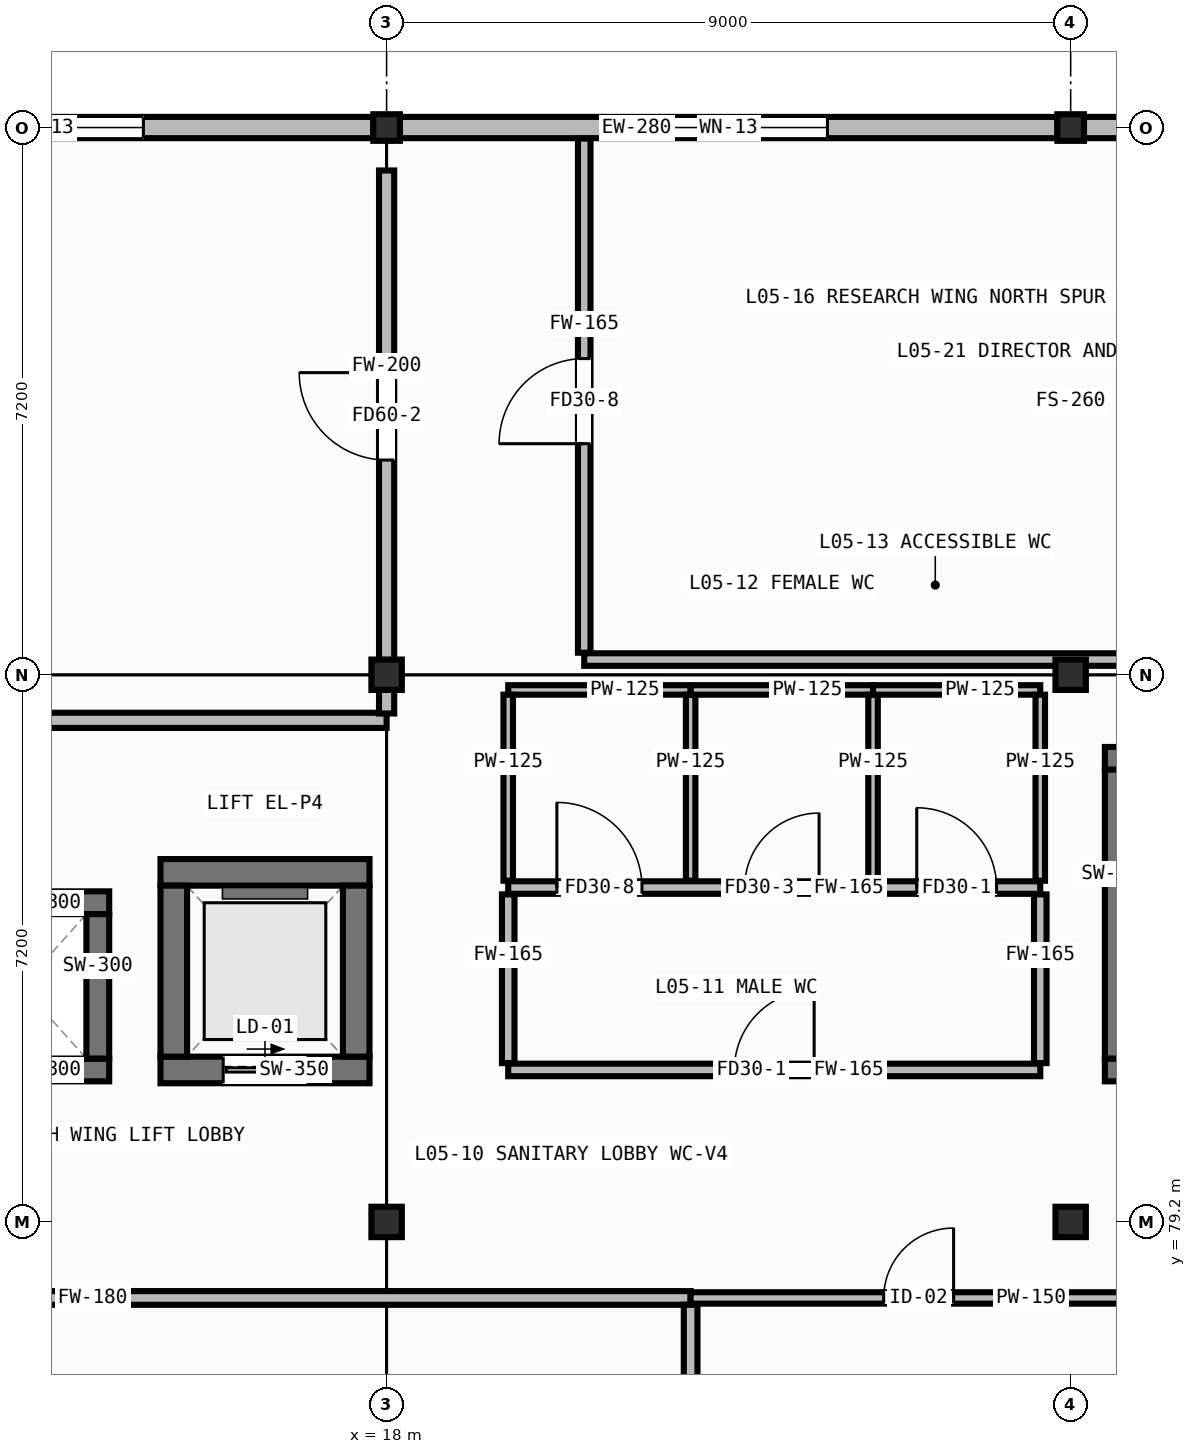
"""IFC4 building model, lengths in metres.
Left out: names, types, materials, properties, quantities, classifications, styles, units other than length and angle.
Written with IfcOpenShell. Run it as: python <this file> out.ifc"""

import sys

from ifc_helpers import new_model, si_unit, direction, frame, frame_2d, origin, origin_2d, place, context, subcontext, project, spatial, rectangle, hollow_rectangle, extrude, element, fill, save


model = new_model("IFC4")
c1 = context("Model", 3, precision=1e-05, world=origin(), true_north=direction((0.0, 1.0)))
c2 = subcontext(c1, "Body", "Model", "MODEL_VIEW")
j1 = project(units=[si_unit("LENGTHUNIT", "METRE"), si_unit("PLANEANGLEUNIT", "RADIAN")], contexts=[c1])
p1 = place(None, origin())
s1 = spatial("IfcSite", under=j1, at=p1, CompositionType="ELEMENT")
p2 = place(p1, origin())
s2 = spatial("IfcBuilding", under=s1, at=p2, CompositionType="ELEMENT")
p3 = place(p2, frame((0.0, 0.0, 17.0)))
s3 = spatial("IfcBuildingStorey", under=s2, at=p3, CompositionType="ELEMENT", Elevation=17.0)
for number, where, z_axis, x_axis in (
    (1, (18.0, 79.2, 0.0), (0.0, 0.0, 1.0), (1.0, 0.0, 0.0)),
    (2, (18.0, 86.4, 0.0), (0.0, 0.0, 1.0), (1.0, 0.0, 0.0)),
):
    element("IfcColumn", number, at=place(p3, frame(where, z_axis=z_axis, x_axis=x_axis)), inside=s3, PredefinedType="COLUMN", context=c2, shape_type="SweptSolid", body=[
        extrude(hollow_rectangle(XDim=0.4, YDim=0.4, WallThickness=0.016, at=origin_2d()), origin(), (0.0, 0.0, 1.0), 3.6),
    ])
p4 = place(p3, frame((18.0, 93.6, 0.0), z_axis=(0.0, 0.0, 1.0), x_axis=(1.0, 0.0, 0.0)))
e3 = element("IfcColumn", 3, at=p4, inside=s3, PredefinedType="COLUMN", context=c2, shape_type="SweptSolid", body=[
    extrude(hollow_rectangle(XDim=0.35, YDim=0.35, WallThickness=0.012, at=origin_2d()), origin(), (0.0, 0.0, 1.0), 3.6),
])
for number, where, z_axis, x_axis in (
    (4, (27.0, 79.2, 0.0), (0.0, 0.0, 1.0), (1.0, 0.0, 0.0)),
    (5, (27.0, 86.4, 0.0), (0.0, 0.0, 1.0), (1.0, 0.0, 0.0)),
):
    element("IfcColumn", number, at=place(p3, frame(where, z_axis=z_axis, x_axis=x_axis)), inside=s3, PredefinedType="COLUMN", context=c2, shape_type="SweptSolid", body=[
        extrude(hollow_rectangle(XDim=0.4, YDim=0.4, WallThickness=0.016, at=origin_2d()), origin(), (0.0, 0.0, 1.0), 3.6),
    ])
p5 = place(p3, frame((27.0, 93.6, 0.0), z_axis=(0.0, 0.0, 1.0), x_axis=(1.0, 0.0, 0.0)))
e6 = element("IfcColumn", 6, at=p5, inside=s3, PredefinedType="COLUMN", context=c2, shape_type="SweptSolid", body=[
    extrude(hollow_rectangle(XDim=0.35, YDim=0.35, WallThickness=0.012, at=origin_2d()), origin(), (0.0, 0.0, 1.0), 3.6),
])
p6 = place(p3, frame((17.825, 93.6, 0.0), z_axis=(0.0, 0.0, 1.0), x_axis=(-1.0, 0.0, 0.0)))
e7 = element("IfcWall", 7, at=p6, inside=s3, PredefinedType="STANDARD", context=c2, shape_type="SweptSolid", body=[
    extrude(rectangle(XDim=8.65, YDim=0.28, at=frame_2d((4.325, 0.0))), origin(), (0.0, 0.0, 1.0), 2.95),
])
p7 = place(p6, frame((3.025, 0.0, 0.85)))
e8 = element("IfcOpeningElement", 8, at=p7, cuts=e7, PredefinedType="OPENING", context=c2, shape_type="SweptSolid", body=[
    extrude(rectangle(XDim=2.6, YDim=1.6, at=frame_2d((1.3, 0.8))), frame((0.0, 0.152, 0.0), z_axis=(0.0, -1.0, 0.0), x_axis=(1.0, 0.0, 0.0)), (0.0, 0.0, 1.0), 0.304),
])
p8 = place(p3, frame((26.825, 93.6, 0.0), z_axis=(0.0, 0.0, 1.0), x_axis=(-1.0, 0.0, 0.0)))
e9 = element("IfcWall", 9, at=p8, inside=s3, PredefinedType="STANDARD", context=c2, shape_type="SweptSolid", body=[
    extrude(rectangle(XDim=8.65, YDim=0.28, at=frame_2d((4.325, 0.0))), origin(), (0.0, 0.0, 1.0), 2.95),
])
p9 = place(p8, frame((3.025, 0.0, 0.85)))
e10 = element("IfcOpeningElement", 10, at=p9, cuts=e9, PredefinedType="OPENING", context=c2, shape_type="SweptSolid", body=[
    extrude(rectangle(XDim=2.6, YDim=1.6, at=frame_2d((1.3, 0.8))), frame((0.0, 0.152, 0.0), z_axis=(0.0, -1.0, 0.0), x_axis=(1.0, 0.0, 0.0)), (0.0, 0.0, 1.0), 0.304),
])
p10 = place(p3, frame((35.825, 93.6, 0.0), z_axis=(0.0, 0.0, 1.0), x_axis=(-1.0, 0.0, 0.0)))
e11 = element("IfcWall", 11, at=p10, inside=s3, PredefinedType="STANDARD", context=c2, shape_type="SweptSolid", body=[
    extrude(rectangle(XDim=8.65, YDim=0.28, at=frame_2d((4.325, 0.0))), origin(), (0.0, 0.0, 1.0), 2.95),
])
p11 = place(p10, frame((3.025, 0.0, 0.85)))
e12 = element("IfcOpeningElement", 12, at=p11, cuts=e11, PredefinedType="OPENING", context=c2, shape_type="SweptSolid", body=[
    extrude(rectangle(XDim=2.6, YDim=1.6, at=frame_2d((1.3, 0.8))), frame((0.0, 0.152, 0.0), z_axis=(0.0, -1.0, 0.0), x_axis=(1.0, 0.0, 0.0)), (0.0, 0.0, 1.0), 0.304),
])
p12 = place(p3, frame((27.45, 81.2, 0.0), z_axis=(0.0, 0.0, 1.0), x_axis=(1.0, 0.0, 0.0)))
e13 = element("IfcWall", 13, at=p12, inside=s3, PredefinedType="SHEAR", context=c2, shape_type="SweptSolid", body=[
    extrude(rectangle(XDim=8.1, YDim=0.3, at=frame_2d((4.05, 0.0))), origin(), (0.0, 0.0, 1.0), 3.34),
])
p13 = place(p12, frame((0.5, 0.0, 0.0)))
e14 = element("IfcOpeningElement", 14, at=p13, cuts=e13, PredefinedType="OPENING", context=c2, shape_type="SweptSolid", body=[
    extrude(rectangle(XDim=1.2, YDim=2.1, at=frame_2d((0.6, 1.05))), frame((0.0, 0.162, 0.0), z_axis=(0.0, -1.0, 0.0), x_axis=(1.0, 0.0, 0.0)), (0.0, 0.0, 1.0), 0.324),
])
p14 = place(p3, frame((27.45, 85.3, 0.0), z_axis=(0.0, 0.0, 1.0), x_axis=(1.0, 0.0, 0.0)))
e15 = element("IfcWall", 15, at=p14, inside=s3, PredefinedType="SHEAR", context=c2, shape_type="SweptSolid", body=[
    extrude(rectangle(XDim=8.1, YDim=0.3, at=frame_2d((4.05, 0.0))), origin(), (0.0, 0.0, 1.0), 3.34),
])
p15 = place(p3, frame((27.6, 81.35, 0.0), z_axis=(0.0, 0.0, 1.0), x_axis=(0.0, 1.0, 0.0)))
e16 = element("IfcWall", 16, at=p15, inside=s3, PredefinedType="SHEAR", context=c2, shape_type="SweptSolid", body=[
    extrude(rectangle(XDim=3.8, YDim=0.3, at=frame_2d((1.9, 0.0))), origin(), (0.0, 0.0, 1.0), 3.34),
])
p16 = place(p3, frame((15.025, 81.2, 0.0), z_axis=(0.0, 0.0, 1.0), x_axis=(1.0, 0.0, 0.0)))
e17 = element("IfcWall", 17, at=p16, inside=s3, PredefinedType="SHEAR", context=c2, shape_type="SweptSolid", body=[
    extrude(rectangle(XDim=2.75, YDim=0.35, at=frame_2d((1.375, 0.0))), origin(), (0.0, 0.0, 1.0), 3.34),
])
p17 = place(p16, frame((0.825, 0.0, 0.0)))
e18 = element("IfcOpeningElement", 18, at=p17, cuts=e17, PredefinedType="OPENING", context=c2, shape_type="SweptSolid", body=[
    extrude(rectangle(XDim=1.1, YDim=2.1, at=frame_2d((0.55, 1.05))), frame((0.0, 0.187, 0.0), z_axis=(0.0, -1.0, 0.0), x_axis=(1.0, 0.0, 0.0)), (0.0, 0.0, 1.0), 0.374),
])
p18 = place(p3, frame((15.025, 83.8, 0.0), z_axis=(0.0, 0.0, 1.0), x_axis=(1.0, 0.0, 0.0)))
e19 = element("IfcWall", 19, at=p18, inside=s3, PredefinedType="SHEAR", context=c2, shape_type="SweptSolid", body=[
    extrude(rectangle(XDim=2.75, YDim=0.35, at=frame_2d((1.375, 0.0))), origin(), (0.0, 0.0, 1.0), 3.34),
])
for number, where, z_axis, x_axis in (
    (20, (15.2, 81.375, 0.0), (0.0, 0.0, 1.0), (0.0, 1.0, 0.0)),
    (21, (17.6, 81.375, 0.0), (0.0, 0.0, 1.0), (0.0, 1.0, 0.0)),
):
    element("IfcWall", number, at=place(p3, frame(where, z_axis=z_axis, x_axis=x_axis)), inside=s3, PredefinedType="SHEAR", context=c2, shape_type="SweptSolid", body=[
        extrude(rectangle(XDim=2.25, YDim=0.35, at=frame_2d((1.125, 0.0))), origin(), (0.0, 0.0, 1.0), 3.34),
    ])
for number, where, z_axis, x_axis in (
    (22, (12.05, 81.2, 0.0), (0.0, 0.0, 1.0), (1.0, 0.0, 0.0)),
    (23, (12.05, 83.4, 0.0), (0.0, 0.0, 1.0), (1.0, 0.0, 0.0)),
):
    element("IfcWall", number, at=place(p3, frame(where, z_axis=z_axis, x_axis=x_axis)), inside=s3, PredefinedType="SHEAR", context=c2, shape_type="SweptSolid", body=[
        extrude(rectangle(XDim=2.3, YDim=0.3, at=frame_2d((1.15, 0.0))), origin(), (0.0, 0.0, 1.0), 3.34),
    ])
p19 = place(p3, frame((14.2, 81.35, 0.0), z_axis=(0.0, 0.0, 1.0), x_axis=(0.0, 1.0, 0.0)))
e24 = element("IfcWall", 24, at=p19, inside=s3, PredefinedType="SHEAR", context=c2, shape_type="SweptSolid", body=[
    extrude(rectangle(XDim=1.9, YDim=0.3, at=frame_2d((0.95, 0.0))), origin(), (0.0, 0.0, 1.0), 3.34),
])
p20 = place(p3, frame((19.6, 81.2, 0.0), z_axis=(0.0, 0.0, 1.0), x_axis=(1.0, 0.0, 0.0)))
e25 = element("IfcWall", 25, at=p20, inside=s3, PredefinedType="PARTITIONING", context=c2, shape_type="SweptSolid", body=[
    extrude(rectangle(XDim=7.0, YDim=0.165, at=frame_2d((3.5, 0.0))), origin(), (0.0, 0.0, 1.0), 3.34),
])
p21 = place(p20, frame((2.975, 0.0, 0.0)))
e26 = element("IfcOpeningElement", 26, at=p21, cuts=e25, PredefinedType="OPENING", context=c2, shape_type="SweptSolid", body=[
    extrude(rectangle(XDim=1.05, YDim=2.1, at=frame_2d((0.525, 1.05))), frame((0.0, 0.094, 0.0), z_axis=(0.0, -1.0, 0.0), x_axis=(1.0, 0.0, 0.0)), (0.0, 0.0, 1.0), 0.189),
])
p22 = place(p3, frame((19.6, 83.6, 0.0), z_axis=(0.0, 0.0, 1.0), x_axis=(1.0, 0.0, 0.0)))
e27 = element("IfcWall", 27, at=p22, inside=s3, PredefinedType="PARTITIONING", context=c2, shape_type="SweptSolid", body=[
    extrude(rectangle(XDim=7.0, YDim=0.165, at=frame_2d((3.5, 0.0))), origin(), (0.0, 0.0, 1.0), 3.34),
])
p23 = place(p22, frame((0.64, 0.0, 0.0)))
e28 = element("IfcOpeningElement", 28, at=p23, cuts=e27, PredefinedType="OPENING", context=c2, shape_type="SweptSolid", body=[
    extrude(rectangle(XDim=1.12, YDim=2.08, at=frame_2d((0.56, 1.04))), frame((0.0, 0.094, 0.0), z_axis=(0.0, -1.0, 0.0), x_axis=(1.0, 0.0, 0.0)), (0.0, 0.0, 1.0), 0.189),
])
p24 = place(p22, frame((3.11, 0.0, 0.0)))
e29 = element("IfcOpeningElement", 29, at=p24, cuts=e27, PredefinedType="OPENING", context=c2, shape_type="SweptSolid", body=[
    extrude(rectangle(XDim=0.98, YDim=2.02, at=frame_2d((0.49, 1.01))), frame((0.0, 0.094, 0.0), z_axis=(0.0, -1.0, 0.0), x_axis=(1.0, 0.0, 0.0)), (0.0, 0.0, 1.0), 0.189),
])
p25 = place(p22, frame((5.375, 0.0, 0.0)))
e30 = element("IfcOpeningElement", 30, at=p25, cuts=e27, PredefinedType="OPENING", context=c2, shape_type="SweptSolid", body=[
    extrude(rectangle(XDim=1.05, YDim=2.1, at=frame_2d((0.525, 1.05))), frame((0.0, 0.094, 0.0), z_axis=(0.0, -1.0, 0.0), x_axis=(1.0, 0.0, 0.0)), (0.0, 0.0, 1.0), 0.189),
])
for number, where, z_axis, x_axis in (
    (31, (19.6, 81.29, 0.0), (0.0, 0.0, 1.0), (0.0, 1.0, 0.0)),
    (32, (26.6, 81.29, 0.0), (0.0, 0.0, 1.0), (0.0, 1.0, 0.0)),
):
    element("IfcWall", number, at=place(p3, frame(where, z_axis=z_axis, x_axis=x_axis)), inside=s3, PredefinedType="PARTITIONING", context=c2, shape_type="SweptSolid", body=[
        extrude(rectangle(XDim=2.22, YDim=0.165, at=frame_2d((1.11, 0.0))), origin(), (0.0, 0.0, 1.0), 3.34),
    ])
p26 = place(p3, frame((19.6, 86.2, 0.0), z_axis=(0.0, 0.0, 1.0), x_axis=(1.0, 0.0, 0.0)))
e33 = element("IfcWall", 33, at=p26, inside=s3, PredefinedType="PARTITIONING", context=c2, shape_type="SweptSolid", body=[
    extrude(rectangle(XDim=2.4, YDim=0.125, at=frame_2d((1.2, 0.0))), origin(), (0.0, 0.0, 1.0), 2.62),
])
for number, where, z_axis, x_axis in (
    (34, (19.6, 83.69, 0.0), (0.0, 0.0, 1.0), (0.0, 1.0, 0.0)),
    (35, (22.0, 83.69, 0.0), (0.0, 0.0, 1.0), (0.0, 1.0, 0.0)),
):
    element("IfcWall", number, at=place(p3, frame(where, z_axis=z_axis, x_axis=x_axis)), inside=s3, PredefinedType="PARTITIONING", context=c2, shape_type="SweptSolid", body=[
        extrude(rectangle(XDim=2.448, YDim=0.125, at=frame_2d((1.224, 0.0))), origin(), (0.0, 0.0, 1.0), 3.34),
    ])
p27 = place(p3, frame((22.0, 86.2, 0.0), z_axis=(0.0, 0.0, 1.0), x_axis=(1.0, 0.0, 0.0)))
e36 = element("IfcWall", 36, at=p27, inside=s3, PredefinedType="PARTITIONING", context=c2, shape_type="SweptSolid", body=[
    extrude(rectangle(XDim=2.4, YDim=0.125, at=frame_2d((1.2, 0.0))), origin(), (0.0, 0.0, 1.0), 2.62),
])
p28 = place(p3, frame((24.4, 83.69, 0.0), z_axis=(0.0, 0.0, 1.0), x_axis=(0.0, 1.0, 0.0)))
e37 = element("IfcWall", 37, at=p28, inside=s3, PredefinedType="PARTITIONING", context=c2, shape_type="SweptSolid", body=[
    extrude(rectangle(XDim=2.448, YDim=0.125, at=frame_2d((1.224, 0.0))), origin(), (0.0, 0.0, 1.0), 3.34),
])
p29 = place(p3, frame((24.4, 86.2, 0.0), z_axis=(0.0, 0.0, 1.0), x_axis=(1.0, 0.0, 0.0)))
e38 = element("IfcWall", 38, at=p29, inside=s3, PredefinedType="PARTITIONING", context=c2, shape_type="SweptSolid", body=[
    extrude(rectangle(XDim=2.2, YDim=0.125, at=frame_2d((1.1, 0.0))), origin(), (0.0, 0.0, 1.0), 2.62),
])
p30 = place(p3, frame((26.6, 83.69, 0.0), z_axis=(0.0, 0.0, 1.0), x_axis=(0.0, 1.0, 0.0)))
e39 = element("IfcWall", 39, at=p30, inside=s3, PredefinedType="PARTITIONING", context=c2, shape_type="SweptSolid", body=[
    extrude(rectangle(XDim=2.448, YDim=0.125, at=frame_2d((1.224, 0.0))), origin(), (0.0, 0.0, 1.0), 3.34),
])
p31 = place(p3, frame((0.145, 78.2, 0.0), z_axis=(0.0, 0.0, 1.0), x_axis=(1.0, 0.0, 0.0)))
e40 = element("IfcWall", 40, at=p31, inside=s3, PredefinedType="PARTITIONING", context=c2, shape_type="SweptSolid", body=[
    extrude(rectangle(XDim=21.855, YDim=0.18, at=frame_2d((10.927, 0.0))), origin(), (0.0, 0.0, 1.0), 3.34),
])
p32 = place(p31, frame((3.705, 0.0, 0.0)))
e41 = element("IfcOpeningElement", 41, at=p32, cuts=e40, PredefinedType="OPENING", context=c2, shape_type="SweptSolid", body=[
    extrude(rectangle(XDim=1.3, YDim=2.08, at=frame_2d((0.65, 1.04))), frame((0.0, 0.102, 0.0), z_axis=(0.0, -1.0, 0.0), x_axis=(1.0, 0.0, 0.0)), (0.0, 0.0, 1.0), 0.204),
])
p33 = place(p3, frame((22.0, 64.945, 0.0), z_axis=(0.0, 0.0, 1.0), x_axis=(0.0, 1.0, 0.0)))
e42 = element("IfcWall", 42, at=p33, inside=s3, PredefinedType="PARTITIONING", context=c2, shape_type="SweptSolid", body=[
    extrude(rectangle(XDim=13.165, YDim=0.18, at=frame_2d((6.583, 0.0))), origin(), (0.0, 0.0, 1.0), 3.34),
])
p34 = place(p3, frame((22.0, 78.2, 0.0), z_axis=(0.0, 0.0, 1.0), x_axis=(1.0, 0.0, 0.0)))
e43 = element("IfcWall", 43, at=p34, inside=s3, PredefinedType="PARTITIONING", context=c2, shape_type="SweptSolid", body=[
    extrude(rectangle(XDim=7.0, YDim=0.15, at=frame_2d((3.5, 0.0))), origin(), (0.0, 0.0, 1.0), 3.34),
])
p35 = place(p34, frame((2.54, 0.0, 0.0)))
e44 = element("IfcOpeningElement", 44, at=p35, cuts=e43, PredefinedType="OPENING", context=c2, shape_type="SweptSolid", body=[
    extrude(rectangle(XDim=0.92, YDim=2.06, at=frame_2d((0.46, 1.03))), frame((0.0, 0.087, 0.0), z_axis=(0.0, -1.0, 0.0), x_axis=(1.0, 0.0, 0.0)), (0.0, 0.0, 1.0), 0.174),
])
p36 = place(p3, frame((0.145, 85.8, 0.0), z_axis=(0.0, 0.0, 1.0), x_axis=(1.0, 0.0, 0.0)))
e45 = element("IfcWall", 45, at=p36, inside=s3, PredefinedType="PARTITIONING", context=c2, shape_type="SweptSolid", body=[
    extrude(rectangle(XDim=17.855, YDim=0.2, at=frame_2d((8.927, 0.0))), origin(), (0.0, 0.0, 1.0), 3.34),
])
p37 = place(p3, frame((18.0, 85.89, 0.0), z_axis=(0.0, 0.0, 1.0), x_axis=(0.0, 1.0, 0.0)))
e46 = element("IfcWall", 46, at=p37, inside=s3, PredefinedType="PARTITIONING", context=c2, shape_type="SweptSolid", body=[
    extrude(rectangle(XDim=7.145, YDim=0.2, at=frame_2d((3.573, 0.0))), origin(), (0.0, 0.0, 1.0), 2.62),
])
p38 = place(p37, frame((3.335, 0.0, 0.0)))
e47 = element("IfcOpeningElement", 47, at=p38, cuts=e46, PredefinedType="OPENING", context=c2, shape_type="SweptSolid", body=[
    extrude(rectangle(XDim=1.15, YDim=2.1, at=frame_2d((0.575, 1.05))), frame((0.0, 0.112, 0.0), z_axis=(0.0, -1.0, 0.0), x_axis=(1.0, 0.0, 0.0)), (0.0, 0.0, 1.0), 0.224),
])
p39 = place(p3, frame((20.6, 86.6, 0.0), z_axis=(0.0, 0.0, 1.0), x_axis=(1.0, 0.0, 0.0)))
e48 = element("IfcWall", 48, at=p39, inside=s3, PredefinedType="PARTITIONING", context=c2, shape_type="SweptSolid", body=[
    extrude(rectangle(XDim=14.945, YDim=0.165, at=frame_2d((7.472, 0.0))), origin(), (0.0, 0.0, 1.0), 2.62),
])
p40 = place(p3, frame((20.6, 86.69, 0.0), z_axis=(0.0, 0.0, 1.0), x_axis=(0.0, 1.0, 0.0)))
e49 = element("IfcWall", 49, at=p40, inside=s3, PredefinedType="PARTITIONING", context=c2, shape_type="SweptSolid", body=[
    extrude(rectangle(XDim=6.765, YDim=0.165, at=frame_2d((3.383, 0.0))), origin(), (0.0, 0.0, 1.0), 3.34),
])
p41 = place(p40, frame((2.75, 0.0, 0.0)))
e50 = element("IfcOpeningElement", 50, at=p41, cuts=e49, PredefinedType="OPENING", context=c2, shape_type="SweptSolid", body=[
    extrude(rectangle(XDim=1.12, YDim=2.08, at=frame_2d((0.56, 1.04))), frame((0.0, 0.094, 0.0), z_axis=(0.0, -1.0, 0.0), x_axis=(1.0, 0.0, 0.0)), (0.0, 0.0, 1.0), 0.189),
])
p42 = place(p7, origin())
e51 = element("IfcWindow", 51, at=p42, inside=s3, PartitioningType="DOUBLE_PANEL_VERTICAL", PredefinedType="WINDOW", context=c2, shape_type="SweptSolid", body=[
    extrude(rectangle(XDim=2.6, YDim=1.6, at=frame_2d((1.3, 0.8))), frame((0.0, 0.03, 0.0), z_axis=(0.0, -1.0, 0.0), x_axis=(1.0, 0.0, 0.0)), (0.0, 0.0, 1.0), 0.06),
])
fill(e8, e51)
p43 = place(p9, origin())
e52 = element("IfcWindow", 52, at=p43, inside=s3, PartitioningType="DOUBLE_PANEL_VERTICAL", PredefinedType="WINDOW", context=c2, shape_type="SweptSolid", body=[
    extrude(rectangle(XDim=2.6, YDim=1.6, at=frame_2d((1.3, 0.8))), frame((0.0, 0.03, 0.0), z_axis=(0.0, -1.0, 0.0), x_axis=(1.0, 0.0, 0.0)), (0.0, 0.0, 1.0), 0.06),
])
fill(e10, e52)
p44 = place(p17, origin())
e53 = element("IfcDoor", 53, at=p44, inside=s3, OperationType="SLIDING_TO_LEFT", PredefinedType="DOOR", context=c2, shape_type="SweptSolid", body=[
    extrude(rectangle(XDim=1.1, YDim=2.1, at=frame_2d((0.55, 1.05))), frame((0.0, 0.025, 0.0), z_axis=(0.0, -1.0, 0.0), x_axis=(1.0, 0.0, 0.0)), (0.0, 0.0, 1.0), 0.05),
])
fill(e18, e53)
p45 = place(p21, origin())
e54 = element("IfcDoor", 54, at=p45, inside=s3, OperationType="SINGLE_SWING_RIGHT", PredefinedType="DOOR", context=c2, shape_type="SweptSolid", body=[
    extrude(rectangle(XDim=1.05, YDim=2.1, at=frame_2d((0.525, 1.05))), frame((0.0, 0.025, 0.0), z_axis=(0.0, -1.0, 0.0), x_axis=(1.0, 0.0, 0.0)), (0.0, 0.0, 1.0), 0.05),
])
fill(e26, e54)
p46 = place(p23, origin())
e55 = element("IfcDoor", 55, at=p46, inside=s3, OperationType="SINGLE_SWING_LEFT", PredefinedType="DOOR", context=c2, shape_type="SweptSolid", body=[
    extrude(rectangle(XDim=1.12, YDim=2.08, at=frame_2d((0.56, 1.04))), frame((0.0, 0.025, 0.0), z_axis=(0.0, -1.0, 0.0), x_axis=(1.0, 0.0, 0.0)), (0.0, 0.0, 1.0), 0.05),
])
fill(e28, e55)
p47 = place(p24, origin())
e56 = element("IfcDoor", 56, at=p47, inside=s3, OperationType="SINGLE_SWING_RIGHT", PredefinedType="DOOR", context=c2, shape_type="SweptSolid", body=[
    extrude(rectangle(XDim=0.98, YDim=2.02, at=frame_2d((0.49, 1.01))), frame((0.0, 0.025, 0.0), z_axis=(0.0, -1.0, 0.0), x_axis=(1.0, 0.0, 0.0)), (0.0, 0.0, 1.0), 0.05),
])
fill(e29, e56)
p48 = place(p25, origin())
e57 = element("IfcDoor", 57, at=p48, inside=s3, OperationType="SINGLE_SWING_LEFT", PredefinedType="DOOR", context=c2, shape_type="SweptSolid", body=[
    extrude(rectangle(XDim=1.05, YDim=2.1, at=frame_2d((0.525, 1.05))), frame((0.0, 0.025, 0.0), z_axis=(0.0, -1.0, 0.0), x_axis=(1.0, 0.0, 0.0)), (0.0, 0.0, 1.0), 0.05),
])
fill(e30, e57)
p49 = place(p35, origin())
e58 = element("IfcDoor", 58, at=p49, inside=s3, OperationType="SINGLE_SWING_RIGHT", PredefinedType="DOOR", context=c2, shape_type="SweptSolid", body=[
    extrude(rectangle(XDim=0.92, YDim=2.06, at=frame_2d((0.46, 1.03))), frame((0.0, 0.025, 0.0), z_axis=(0.0, -1.0, 0.0), x_axis=(1.0, 0.0, 0.0)), (0.0, 0.0, 1.0), 0.05),
])
fill(e44, e58)
p50 = place(p38, origin())
e59 = element("IfcDoor", 59, at=p50, inside=s3, OperationType="SINGLE_SWING_RIGHT", PredefinedType="DOOR", context=c2, shape_type="SweptSolid", body=[
    extrude(rectangle(XDim=1.15, YDim=2.1, at=frame_2d((0.575, 1.05))), frame((0.0, 0.025, 0.0), z_axis=(0.0, -1.0, 0.0), x_axis=(1.0, 0.0, 0.0)), (0.0, 0.0, 1.0), 0.05),
])
fill(e47, e59)
p51 = place(p41, origin())
e60 = element("IfcDoor", 60, at=p51, inside=s3, OperationType="SINGLE_SWING_LEFT", PredefinedType="DOOR", context=c2, shape_type="SweptSolid", body=[
    extrude(rectangle(XDim=1.12, YDim=2.08, at=frame_2d((0.56, 1.04))), frame((0.0, 0.025, 0.0), z_axis=(0.0, -1.0, 0.0), x_axis=(1.0, 0.0, 0.0)), (0.0, 0.0, 1.0), 0.05),
])
fill(e50, e60)
save(model, sys.argv[1])
